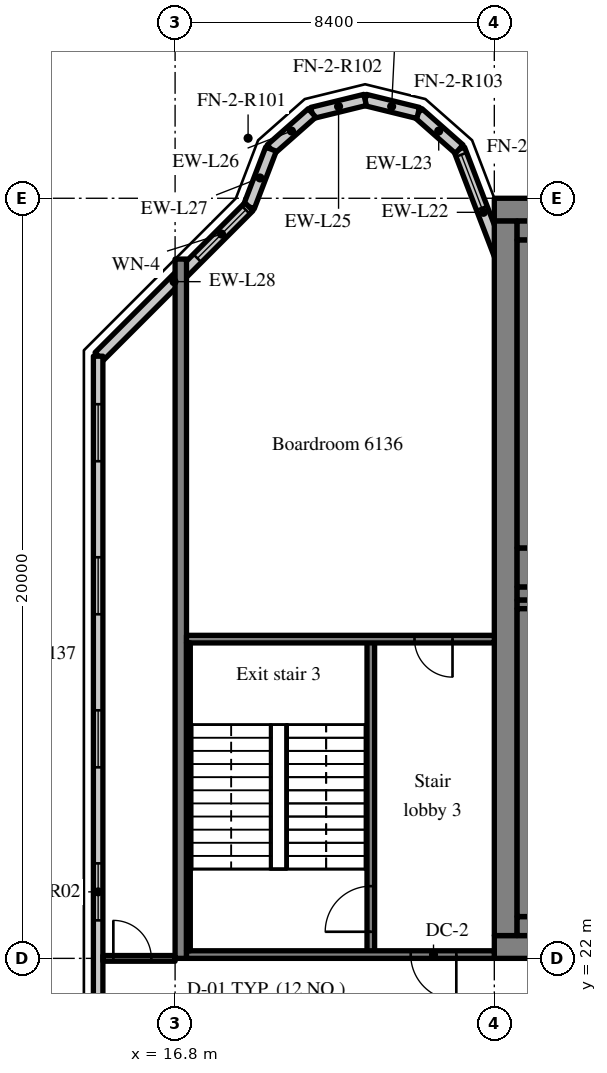
"""IFC4 building model, lengths in metres.
Left out: names, types, materials, properties, quantities, classifications, styles, units other than length and angle.
Written with IfcOpenShell. Run it as: python <this file> out.ifc"""

import sys

from ifc_helpers import new_model, si_unit, direction, frame, frame_2d, origin, place, context, subcontext, project, spatial, rectangle, extrude, source, transform, mapped, element, fill, save


model = new_model("IFC4")
c1 = context("Model", 3, precision=1e-05, world=origin(), true_north=direction((0.0, 1.0)))
c2 = subcontext(c1, "Body", "Model", "MODEL_VIEW")
j1 = project(units=[si_unit("LENGTHUNIT", "METRE"), si_unit("PLANEANGLEUNIT", "RADIAN")], contexts=[c1])
p1 = place(None, origin())
s1 = spatial("IfcSite", under=j1, at=p1, CompositionType="ELEMENT")
p2 = place(p1, origin())
s2 = spatial("IfcBuilding", under=s1, at=p2, CompositionType="ELEMENT")
p3 = place(p2, frame((0.0, 0.0, 253.0)))
s3 = spatial("IfcBuildingStorey", under=s2, at=p3, CompositionType="ELEMENT", Elevation=253.0)
m1 = source(origin(), c2, "Body", "SweptSolid", [
    extrude(rectangle(XDim=50.4, YDim=0.6, at=frame_2d((25.2, 0.0))), origin(), (0.0, 0.0, 1.0), 3.62),
])
p4 = place(p3, frame((25.2, 22.3, 0.0), z_axis=(0.0, 0.0, 1.0), x_axis=(1.0, 0.0, 0.0)))
e1 = element("IfcWall", 1, at=p4, inside=s3, PredefinedType="SHEAR", context=c2, shape_type="MappedRepresentation", body=[
    mapped(m1, transform((0.0, 0.0, 0.0), scale=1.0)),
])
m2 = source(origin(), c2, "Body", "SweptSolid", [
    extrude(rectangle(XDim=1.8, YDim=2.1, at=frame_2d((0.9, 1.05))), frame((0.0, 0.31, 0.0), z_axis=(0.0, -1.0, 0.0), x_axis=(1.0, 0.0, 0.0)), (0.0, 0.0, 1.0), 0.62),
])
p5 = place(p4, frame((15.9, 0.0, 0.0)))
e2 = element("IfcOpeningElement", 2, at=p5, cuts=e1, PredefinedType="OPENING", context=c2, shape_type="MappedRepresentation", body=[
    mapped(m2, transform((0.0, 0.0, 0.0), scale=1.0)),
])
m3 = source(origin(), c2, "Body", "SweptSolid", [
    extrude(rectangle(XDim=0.9, YDim=2.1, at=frame_2d((0.45, 1.05))), frame((0.0, 0.31, 0.0), z_axis=(0.0, -1.0, 0.0), x_axis=(1.0, 0.0, 0.0)), (0.0, 0.0, 1.0), 0.62),
])
p6 = place(p4, frame((21.513, 0.0, 0.0)))
e3 = element("IfcOpeningElement", 3, at=p6, cuts=e1, PredefinedType="OPENING", context=c2, shape_type="MappedRepresentation", body=[
    mapped(m3, transform((0.0, 0.0, 0.0), scale=1.0)),
])
p7 = place(p4, frame((32.7, 0.0, 0.0)))
e4 = element("IfcOpeningElement", 4, at=p7, cuts=e1, PredefinedType="OPENING", context=c2, shape_type="MappedRepresentation", body=[
    mapped(m2, transform((0.0, 0.0, 0.0), scale=1.0)),
])
m4 = source(origin(), c2, "Body", "SweptSolid", [
    extrude(rectangle(XDim=1.2, YDim=2.1, at=frame_2d((0.6, 1.05))), frame((0.0, 0.31, 0.0), z_axis=(0.0, -1.0, 0.0), x_axis=(1.0, 0.0, 0.0)), (0.0, 0.0, 1.0), 0.62),
])
p8 = place(p4, frame((6.488, 0.0, 0.0)))
e5 = element("IfcOpeningElement", 5, at=p8, cuts=e1, PredefinedType="OPENING", context=c2, shape_type="MappedRepresentation", body=[
    mapped(m4, transform((0.0, 0.0, 0.0), scale=1.0)),
])
p9 = place(p4, frame((47.925, 0.0, 0.0)))
e6 = element("IfcOpeningElement", 6, at=p9, cuts=e1, PredefinedType="OPENING", context=c2, shape_type="MappedRepresentation", body=[
    mapped(m4, transform((0.0, 0.0, 0.0), scale=1.0)),
])
p10 = place(p3, frame((25.2, 41.7, 0.0), z_axis=(0.0, 0.0, 1.0), x_axis=(1.0, 0.0, 0.0)))
e7 = element("IfcWall", 7, at=p10, inside=s3, PredefinedType="SHEAR", context=c2, shape_type="MappedRepresentation", body=[
    mapped(m1, transform((0.0, 0.0, 0.0), scale=1.0)),
])
m5 = source(origin(), c2, "Body", "SweptSolid", [
    extrude(rectangle(XDim=18.8, YDim=0.6, at=frame_2d((9.4, 0.0))), origin(), (0.0, 0.0, 1.0), 3.62),
])
p11 = place(p3, frame((25.5, 22.6, 0.0), z_axis=(0.0, 0.0, 1.0), x_axis=(0.0, 1.0, 0.0)))
e8 = element("IfcWall", 8, at=p11, inside=s3, PredefinedType="SHEAR", context=c2, shape_type="MappedRepresentation", body=[
    mapped(m5, transform((0.0, 0.0, 0.0), scale=1.0)),
])
m6 = source(origin(), c2, "Body", "SweptSolid", [
    extrude(rectangle(XDim=7.625, YDim=0.35, at=frame_2d((3.812, 0.0))), origin(), (0.0, 0.0, 1.0), 3.62),
])
p12 = place(p3, frame((25.8, 31.6, 0.0), z_axis=(0.0, 0.0, 1.0), x_axis=(1.0, 0.0, 0.0)))
e9 = element("IfcWall", 9, at=p12, inside=s3, PredefinedType="SHEAR", context=c2, shape_type="MappedRepresentation", body=[
    mapped(m6, transform((0.0, 0.0, 0.0), scale=1.0)),
])
m7 = source(origin(), c2, "Body", "SweptSolid", [
    extrude(rectangle(XDim=1.1, YDim=2.1, at=frame_2d((0.55, 1.05))), frame((0.0, 0.185, 0.0), z_axis=(0.0, -1.0, 0.0), x_axis=(1.0, 0.0, 0.0)), (0.0, 0.0, 1.0), 0.37),
])
p13 = place(p12, frame((5.938, 0.0, 0.0)))
e10 = element("IfcOpeningElement", 10, at=p13, cuts=e9, PredefinedType="OPENING", context=c2, shape_type="MappedRepresentation", body=[
    mapped(m7, transform((0.0, 0.0, 0.0), scale=1.0)),
])
m8 = source(origin(), c2, "Body", "SweptSolid", [
    extrude(rectangle(XDim=18.4, YDim=0.3, at=frame_2d((9.2, 0.0))), origin(), (0.0, 0.0, 1.0), 3.62),
])
p14 = place(p3, frame((16.95, 22.0, 0.0), z_axis=(0.0, 0.0, 1.0), x_axis=(0.0, 1.0, 0.0)))
e11 = element("IfcWall", 11, at=p14, inside=s3, PredefinedType="SHEAR", context=c2, shape_type="MappedRepresentation", body=[
    mapped(m8, transform((0.0, 0.0, 0.0), scale=1.0)),
])
m9 = source(origin(), c2, "Body", "SweptSolid", [
    extrude(rectangle(XDim=3.559, YDim=0.3, at=frame_2d((1.78, 0.0))), origin(), (0.0, 0.0, 1.0), 3.62),
])
p15 = place(p3, frame((25.55, 39.969, 0.0), z_axis=(0.0, 0.0, 1.0), x_axis=(-0.35779745313, 0.933799219604, 0.0)))
e12 = element("IfcWall", 12, at=p15, inside=s3, PredefinedType="SOLIDWALL", context=c2, shape_type="MappedRepresentation", body=[
    mapped(m9, transform((0.0, 0.0, 0.0), scale=1.0)),
])
m10 = source(origin(), c2, "Body", "SweptSolid", [
    extrude(rectangle(XDim=1.5, YDim=2.0, at=frame_2d((0.75, 1.0))), frame((0.0, 0.16, 0.0), z_axis=(0.0, -1.0, 0.0), x_axis=(1.0, 0.0, 0.0)), (0.0, 0.0, 1.0), 0.32),
])
p16 = place(p15, frame((1.903, 0.0, 0.9)))
e13 = element("IfcOpeningElement", 13, at=p16, cuts=e12, PredefinedType="OPENING", context=c2, shape_type="MappedRepresentation", body=[
    mapped(m10, transform((0.0, 0.0, 0.0), scale=1.0)),
])
m11 = source(origin(), c2, "Body", "SweptSolid", [
    extrude(rectangle(XDim=1.44, YDim=0.3, at=frame_2d((0.72, 0.0))), origin(), (0.0, 0.0, 1.0), 3.62),
])
p17 = place(p3, frame((24.277, 43.292, 0.0), z_axis=(0.0, 0.0, 1.0), x_axis=(-0.749649827867, 0.661834673902, 0.0)))
e14 = element("IfcWall", 14, at=p17, inside=s3, PredefinedType="SOLIDWALL", context=c2, shape_type="MappedRepresentation", body=[
    mapped(m11, transform((0.0, 0.0, 0.0), scale=1.0)),
])
m12 = source(origin(), c2, "Body", "SweptSolid", [
    extrude(rectangle(XDim=1.438, YDim=0.3, at=frame_2d((0.719, 0.0))), origin(), (0.0, 0.0, 1.0), 3.62),
])
p18 = place(p3, frame((23.197, 44.245, 0.0), z_axis=(0.0, 0.0, 1.0), x_axis=(-0.971152283879, 0.238460146601, 0.0)))
e15 = element("IfcWall", 15, at=p18, inside=s3, PredefinedType="SOLIDWALL", context=c2, shape_type="MappedRepresentation", body=[
    mapped(m12, transform((0.0, 0.0, 0.0), scale=1.0)),
])
m13 = source(origin(), c2, "Body", "SweptSolid", [
    extrude(rectangle(XDim=1.439, YDim=0.3, at=frame_2d((0.719, 0.0))), origin(), (0.0, 0.0, 1.0), 3.62),
])
p19 = place(p3, frame((21.8, 44.588, 0.0), z_axis=(0.0, 0.0, 1.0), x_axis=(-0.971161932466, -0.238420848351, 0.0)))
e16 = element("IfcWall", 16, at=p19, inside=s3, PredefinedType="SOLIDWALL", context=c2, shape_type="MappedRepresentation", body=[
    mapped(m13, transform((0.0, 0.0, 0.0), scale=1.0)),
])
m14 = source(origin(), c2, "Body", "SweptSolid", [
    extrude(rectangle(XDim=1.44, YDim=0.3, at=frame_2d((0.72, 0.0))), origin(), (0.0, 0.0, 1.0), 3.62),
])
p20 = place(p3, frame((20.403, 44.245, 0.0), z_axis=(0.0, 0.0, 1.0), x_axis=(-0.74957555648, -0.661918790432, 0.0)))
e17 = element("IfcWall", 17, at=p20, inside=s3, PredefinedType="SOLIDWALL", context=c2, shape_type="MappedRepresentation", body=[
    mapped(m14, transform((0.0, 0.0, 0.0), scale=1.0)),
])
m15 = source(origin(), c2, "Body", "SweptSolid", [
    extrude(rectangle(XDim=1.622, YDim=0.3, at=frame_2d((0.811, 0.0))), origin(), (0.0, 0.0, 1.0), 3.62),
])
p21 = place(p3, frame((19.323, 43.292, 0.0), z_axis=(0.0, 0.0, 1.0), x_axis=(-0.357778527068, -0.933806471154, 0.0)))
e18 = element("IfcWall", 18, at=p21, inside=s3, PredefinedType="SOLIDWALL", context=c2, shape_type="MappedRepresentation", body=[
    mapped(m15, transform((0.0, 0.0, 0.0), scale=1.0)),
])
m16 = source(origin(), c2, "Body", "SweptSolid", [
    extrude(rectangle(XDim=5.576, YDim=0.3, at=frame_2d((2.788, 0.0))), origin(), (0.0, 0.0, 1.0), 3.62),
])
p22 = place(p3, frame((18.743, 41.777, 0.0), z_axis=(0.0, 0.0, 1.0), x_axis=(-0.707106781187, -0.707106781187, 0.0)))
e19 = element("IfcWall", 19, at=p22, inside=s3, PredefinedType="SOLIDWALL", context=c2, shape_type="MappedRepresentation", body=[
    mapped(m16, transform((0.0, 0.0, 0.0), scale=1.0)),
])
m17 = source(origin(), c2, "Body", "SweptSolid", [
    extrude(rectangle(XDim=1.8, YDim=1.5, at=frame_2d((0.9, 0.75))), frame((0.0, 0.16, 0.0), z_axis=(0.0, -1.0, 0.0), x_axis=(1.0, 0.0, 0.0)), (0.0, 0.0, 1.0), 0.32),
])
p23 = place(p22, frame((0.118, 0.0, 0.9)))
e20 = element("IfcOpeningElement", 20, at=p23, cuts=e19, PredefinedType="OPENING", context=c2, shape_type="MappedRepresentation", body=[
    mapped(m17, transform((0.0, 0.0, 0.0), scale=1.0)),
])
m18 = source(origin(), c2, "Body", "SweptSolid", [
    extrude(rectangle(XDim=28.189, YDim=0.25, at=frame_2d((14.095, 0.0))), origin(), (0.0, 0.0, 1.0), 3.62),
])
p24 = place(p3, frame((14.775, 37.845, 0.0), z_axis=(0.0, 0.0, 1.0), x_axis=(0.0, -1.0, 0.0)))
e21 = element("IfcWall", 21, at=p24, inside=s3, PredefinedType="SOLIDWALL", context=c2, shape_type="MappedRepresentation", body=[
    mapped(m18, transform((0.0, 0.0, 0.0), scale=1.0)),
])
m19 = source(origin(), c2, "Body", "SweptSolid", [
    extrude(rectangle(XDim=1.5, YDim=1.5, at=frame_2d((0.75, 0.75))), frame((0.0, 0.135, 0.0), z_axis=(0.0, -1.0, 0.0), x_axis=(1.0, 0.0, 0.0)), (0.0, 0.0, 1.0), 0.27),
])
p25 = place(p24, frame((1.263, 0.0, 0.9)))
e22 = element("IfcOpeningElement", 22, at=p25, cuts=e21, PredefinedType="OPENING", context=c2, shape_type="MappedRepresentation", body=[
    mapped(m19, transform((0.0, 0.0, 0.0), scale=1.0)),
])
p26 = place(p24, frame((5.291, 0.0, 0.9)))
e23 = element("IfcOpeningElement", 23, at=p26, cuts=e21, PredefinedType="OPENING", context=c2, shape_type="MappedRepresentation", body=[
    mapped(m19, transform((0.0, 0.0, 0.0), scale=1.0)),
])
p27 = place(p24, frame((9.318, 0.0, 0.9)))
e24 = element("IfcOpeningElement", 24, at=p27, cuts=e21, PredefinedType="OPENING", context=c2, shape_type="MappedRepresentation", body=[
    mapped(m19, transform((0.0, 0.0, 0.0), scale=1.0)),
])
p28 = place(p24, frame((13.345, 0.0, 0.9)))
e25 = element("IfcOpeningElement", 25, at=p28, cuts=e21, PredefinedType="OPENING", context=c2, shape_type="MappedRepresentation", body=[
    mapped(m19, transform((0.0, 0.0, 0.0), scale=1.0)),
])
p29 = place(p24, frame((17.372, 0.0, 0.9)))
e26 = element("IfcOpeningElement", 26, at=p29, cuts=e21, PredefinedType="OPENING", context=c2, shape_type="MappedRepresentation", body=[
    mapped(m19, transform((0.0, 0.0, 0.0), scale=1.0)),
])
p30 = place(p24, frame((21.399, 0.0, 0.9)))
e27 = element("IfcOpeningElement", 27, at=p30, cuts=e21, PredefinedType="OPENING", context=c2, shape_type="MappedRepresentation", body=[
    mapped(m19, transform((0.0, 0.0, 0.0), scale=1.0)),
])
p31 = place(p24, frame((25.426, 0.0, 0.9)))
e28 = element("IfcOpeningElement", 28, at=p31, cuts=e21, PredefinedType="OPENING", context=c2, shape_type="MappedRepresentation", body=[
    mapped(m19, transform((0.0, 0.0, 0.0), scale=1.0)),
])
m20 = source(origin(), c2, "Body", "SweptSolid", [
    extrude(rectangle(XDim=8.3, YDim=0.2, at=frame_2d((4.15, 0.0))), origin(), (0.0, 0.0, 1.0), 3.62),
])
p32 = place(p3, frame((21.95, 22.1, 0.0), z_axis=(0.0, 0.0, 1.0), x_axis=(0.0, 1.0, 0.0)))
e29 = element("IfcWall", 29, at=p32, inside=s3, PredefinedType="SOLIDWALL", context=c2, shape_type="MappedRepresentation", body=[
    mapped(m20, transform((0.0, 0.0, 0.0), scale=1.0)),
])
m21 = source(origin(), c2, "Body", "SweptSolid", [
    extrude(rectangle(XDim=1.2, YDim=2.1, at=frame_2d((0.6, 1.05))), frame((0.0, 0.11, 0.0), z_axis=(0.0, -1.0, 0.0), x_axis=(1.0, 0.0, 0.0)), (0.0, 0.0, 1.0), 0.22),
])
p33 = place(p32, frame((0.6, 0.0, 0.0)))
e30 = element("IfcOpeningElement", 30, at=p33, cuts=e29, PredefinedType="OPENING", context=c2, shape_type="MappedRepresentation", body=[
    mapped(m21, transform((0.0, 0.0, 0.0), scale=1.0)),
])
m22 = source(origin(), c2, "Body", "SweptSolid", [
    extrude(rectangle(XDim=8.1, YDim=0.2, at=frame_2d((4.05, 0.0))), origin(), (0.0, 0.0, 1.0), 3.62),
])
p34 = place(p3, frame((17.1, 22.1, 0.0), z_axis=(0.0, 0.0, 1.0), x_axis=(1.0, 0.0, 0.0)))
e31 = element("IfcWall", 31, at=p34, inside=s3, PredefinedType="SOLIDWALL", context=c2, shape_type="MappedRepresentation", body=[
    mapped(m22, transform((0.0, 0.0, 0.0), scale=1.0)),
])
p35 = place(p34, frame((5.9, 0.0, 0.0)))
e32 = element("IfcOpeningElement", 32, at=p35, cuts=e31, PredefinedType="OPENING", context=c2, shape_type="MappedRepresentation", body=[
    mapped(m21, transform((0.0, 0.0, 0.0), scale=1.0)),
])
p36 = place(p3, frame((17.1, 30.4, 0.0), z_axis=(0.0, 0.0, 1.0), x_axis=(1.0, 0.0, 0.0)))
e33 = element("IfcWall", 33, at=p36, inside=s3, PredefinedType="SOLIDWALL", context=c2, shape_type="MappedRepresentation", body=[
    mapped(m22, transform((0.0, 0.0, 0.0), scale=1.0)),
])
m23 = source(origin(), c2, "Body", "SweptSolid", [
    extrude(rectangle(XDim=1.0, YDim=2.1, at=frame_2d((0.5, 1.05))), frame((0.0, 0.11, 0.0), z_axis=(0.0, -1.0, 0.0), x_axis=(1.0, 0.0, 0.0)), (0.0, 0.0, 1.0), 0.22),
])
p37 = place(p36, frame((6.0, 0.0, 0.0)))
e34 = element("IfcOpeningElement", 34, at=p37, cuts=e33, PredefinedType="OPENING", context=c2, shape_type="MappedRepresentation", body=[
    mapped(m23, transform((0.0, 0.0, 0.0), scale=1.0)),
])
m24 = source(origin(), c2, "Body", "SweptSolid", [
    extrude(rectangle(XDim=5.15, YDim=0.5, at=frame_2d((2.575, 0.0))), origin(), (0.0, 0.0, 1.0), 3.62),
])
p38 = place(p3, frame((25.8, 22.85, 0.0), z_axis=(0.0, 0.0, 1.0), x_axis=(1.0, 0.0, 0.0)))
e35 = element("IfcWall", 35, at=p38, inside=s3, PredefinedType="SOLIDWALL", context=c2, shape_type="MappedRepresentation", body=[
    mapped(m24, transform((0.0, 0.0, 0.0), scale=1.0)),
])
m25 = source(origin(), c2, "Body", "SweptSolid", [
    extrude(rectangle(XDim=5.15, YDim=0.225, at=frame_2d((2.575, 0.0))), origin(), (0.0, 0.0, 1.0), 3.62),
])
p39 = place(p3, frame((25.8, 31.312, 0.0), z_axis=(0.0, 0.0, 1.0), x_axis=(1.0, 0.0, 0.0)))
e36 = element("IfcWall", 36, at=p39, inside=s3, PredefinedType="SOLIDWALL", context=c2, shape_type="MappedRepresentation", body=[
    mapped(m25, transform((0.0, 0.0, 0.0), scale=1.0)),
])
m26 = source(origin(), c2, "Body", "SweptSolid", [
    extrude(rectangle(XDim=8.1, YDim=0.5, at=frame_2d((4.05, 0.0))), origin(), (0.0, 0.0, 1.0), 3.62),
])
p40 = place(p3, frame((26.05, 23.1, 0.0), z_axis=(0.0, 0.0, 1.0), x_axis=(0.0, 1.0, 0.0)))
e37 = element("IfcWall", 37, at=p40, inside=s3, PredefinedType="SOLIDWALL", context=c2, shape_type="MappedRepresentation", body=[
    mapped(m26, transform((0.0, 0.0, 0.0), scale=1.0)),
])
m27 = source(origin(), c2, "Body", "SweptSolid", [
    extrude(rectangle(XDim=8.1, YDim=0.1, at=frame_2d((4.05, 0.0))), origin(), (0.0, 0.0, 1.0), 3.62),
])
p41 = place(p3, frame((17.15, 22.2, 0.0), z_axis=(0.0, 0.0, 1.0), x_axis=(0.0, 1.0, 0.0)))
e38 = element("IfcWall", 38, at=p41, inside=s3, PredefinedType="SOLIDWALL", context=c2, shape_type="MappedRepresentation", body=[
    mapped(m27, transform((0.0, 0.0, 0.0), scale=1.0)),
])
p42 = place(p3, frame((25.8, 41.15, 0.0), z_axis=(0.0, 0.0, 1.0), x_axis=(1.0, 0.0, 0.0)))
e39 = element("IfcWall", 39, at=p42, inside=s3, PredefinedType="SOLIDWALL", context=c2, shape_type="MappedRepresentation", body=[
    mapped(m24, transform((0.0, 0.0, 0.0), scale=1.0)),
])
m28 = source(origin(), c2, "Body", "SweptSolid", [
    extrude(rectangle(XDim=5.15, YDim=1.025, at=frame_2d((2.575, 0.0))), origin(), (0.0, 0.0, 1.0), 3.62),
])
p43 = place(p3, frame((25.8, 32.287, 0.0), z_axis=(0.0, 0.0, 1.0), x_axis=(1.0, 0.0, 0.0)))
e40 = element("IfcWall", 40, at=p43, inside=s3, PredefinedType="SOLIDWALL", context=c2, shape_type="MappedRepresentation", body=[
    mapped(m28, transform((0.0, 0.0, 0.0), scale=1.0)),
])
p44 = place(p3, frame((26.05, 32.8, 0.0), z_axis=(0.0, 0.0, 1.0), x_axis=(0.0, 1.0, 0.0)))
e41 = element("IfcWall", 41, at=p44, inside=s3, PredefinedType="SOLIDWALL", context=c2, shape_type="MappedRepresentation", body=[
    mapped(m26, transform((0.0, 0.0, 0.0), scale=1.0)),
])
m29 = source(origin(), c2, "Body", "SweptSolid", [
    extrude(rectangle(XDim=1.9, YDim=0.15, at=frame_2d((0.95, 0.0))), origin(), (0.0, 0.0, 1.0), 2.92),
])
p45 = place(p3, frame((14.9, 22.0, 0.0), z_axis=(0.0, 0.0, 1.0), x_axis=(1.0, 0.0, 0.0)))
e42 = element("IfcWall", 42, at=p45, inside=s3, PredefinedType="PARTITIONING", context=c2, shape_type="MappedRepresentation", body=[
    mapped(m29, transform((0.0, 0.0, 0.0), scale=1.0)),
])
m30 = source(origin(), c2, "Body", "SweptSolid", [
    extrude(rectangle(XDim=1.0, YDim=2.1, at=frame_2d((0.5, 1.05))), frame((0.0, 0.085, 0.0), z_axis=(0.0, -1.0, 0.0), x_axis=(1.0, 0.0, 0.0)), (0.0, 0.0, 1.0), 0.17),
])
p46 = place(p45, frame((0.275, 0.0, 0.0)))
e43 = element("IfcOpeningElement", 43, at=p46, cuts=e42, PredefinedType="OPENING", context=c2, shape_type="MappedRepresentation", body=[
    mapped(m30, transform((0.0, 0.0, 0.0), scale=1.0)),
])
m31 = source(origin(), c2, "Body", "SweptSolid", [
    extrude(rectangle(XDim=1.5, YDim=2.0, at=frame_2d((0.75, 1.0))), frame((0.0, 0.03, 0.0), z_axis=(0.0, -1.0, 0.0), x_axis=(1.0, 0.0, 0.0)), (0.0, 0.0, 1.0), 0.06),
])
p47 = place(p16, origin())
e44 = element("IfcWindow", 44, at=p47, inside=s3, PartitioningType="SINGLE_PANEL", PredefinedType="WINDOW", context=c2, shape_type="MappedRepresentation", body=[
    mapped(m31, transform((0.0, 0.0, 0.0), scale=1.0)),
])
fill(e13, e44)
m32 = source(origin(), c2, "Body", "SweptSolid", [
    extrude(rectangle(XDim=1.8, YDim=1.5, at=frame_2d((0.9, 0.75))), frame((0.0, 0.03, 0.0), z_axis=(0.0, -1.0, 0.0), x_axis=(1.0, 0.0, 0.0)), (0.0, 0.0, 1.0), 0.06),
])
p48 = place(p23, origin())
e45 = element("IfcWindow", 45, at=p48, inside=s3, PartitioningType="SINGLE_PANEL", PredefinedType="WINDOW", context=c2, shape_type="MappedRepresentation", body=[
    mapped(m32, transform((0.0, 0.0, 0.0), scale=1.0)),
])
fill(e20, e45)
m33 = source(origin(), c2, "Body", "SweptSolid", [
    extrude(rectangle(XDim=1.5, YDim=1.5, at=frame_2d((0.75, 0.75))), frame((0.0, 0.03, 0.0), z_axis=(0.0, -1.0, 0.0), x_axis=(1.0, 0.0, 0.0)), (0.0, 0.0, 1.0), 0.06),
])
p49 = place(p25, origin())
e46 = element("IfcWindow", 46, at=p49, inside=s3, PartitioningType="SINGLE_PANEL", PredefinedType="WINDOW", context=c2, shape_type="MappedRepresentation", body=[
    mapped(m33, transform((0.0, 0.0, 0.0), scale=1.0)),
])
fill(e22, e46)
p50 = place(p26, origin())
e47 = element("IfcWindow", 47, at=p50, inside=s3, PartitioningType="SINGLE_PANEL", PredefinedType="WINDOW", context=c2, shape_type="MappedRepresentation", body=[
    mapped(m33, transform((0.0, 0.0, 0.0), scale=1.0)),
])
fill(e23, e47)
p51 = place(p27, origin())
e48 = element("IfcWindow", 48, at=p51, inside=s3, PartitioningType="SINGLE_PANEL", PredefinedType="WINDOW", context=c2, shape_type="MappedRepresentation", body=[
    mapped(m33, transform((0.0, 0.0, 0.0), scale=1.0)),
])
fill(e24, e48)
p52 = place(p28, origin())
e49 = element("IfcWindow", 49, at=p52, inside=s3, PartitioningType="SINGLE_PANEL", PredefinedType="WINDOW", context=c2, shape_type="MappedRepresentation", body=[
    mapped(m33, transform((0.0, 0.0, 0.0), scale=1.0)),
])
fill(e25, e49)
m34 = source(origin(), c2, "Body", "SweptSolid", [
    extrude(rectangle(XDim=1.2, YDim=2.1, at=frame_2d((0.6, 1.05))), frame((0.0, 0.025, 0.0), z_axis=(0.0, -1.0, 0.0), x_axis=(1.0, 0.0, 0.0)), (0.0, 0.0, 1.0), 0.05),
])
p53 = place(p33, origin())
e50 = element("IfcDoor", 50, at=p53, inside=s3, OperationType="SINGLE_SWING_LEFT", PredefinedType="DOOR", context=c2, shape_type="MappedRepresentation", body=[
    mapped(m34, transform((0.0, 0.0, 0.0), scale=1.0)),
])
fill(e30, e50)
p54 = place(p35, origin())
e51 = element("IfcDoor", 51, at=p54, inside=s3, OperationType="SINGLE_SWING_RIGHT", PredefinedType="DOOR", context=c2, shape_type="MappedRepresentation", body=[
    mapped(m34, transform((0.0, 0.0, 0.0), scale=1.0)),
])
fill(e32, e51)
m35 = source(origin(), c2, "Body", "SweptSolid", [
    extrude(rectangle(XDim=1.0, YDim=2.1, at=frame_2d((0.5, 1.05))), frame((0.0, 0.025, 0.0), z_axis=(0.0, -1.0, 0.0), x_axis=(1.0, 0.0, 0.0)), (0.0, 0.0, 1.0), 0.05),
])
p55 = place(p37, origin())
e52 = element("IfcDoor", 52, at=p55, inside=s3, OperationType="SINGLE_SWING_RIGHT", PredefinedType="DOOR", context=c2, shape_type="MappedRepresentation", body=[
    mapped(m35, transform((0.0, 0.0, 0.0), scale=1.0)),
])
fill(e34, e52)
p56 = place(p46, origin())
e53 = element("IfcDoor", 53, at=p56, inside=s3, OperationType="SINGLE_SWING_LEFT", PredefinedType="DOOR", context=c2, shape_type="MappedRepresentation", body=[
    mapped(m35, transform((0.0, 0.0, 0.0), scale=1.0)),
])
fill(e43, e53)
save(model, sys.argv[1])
